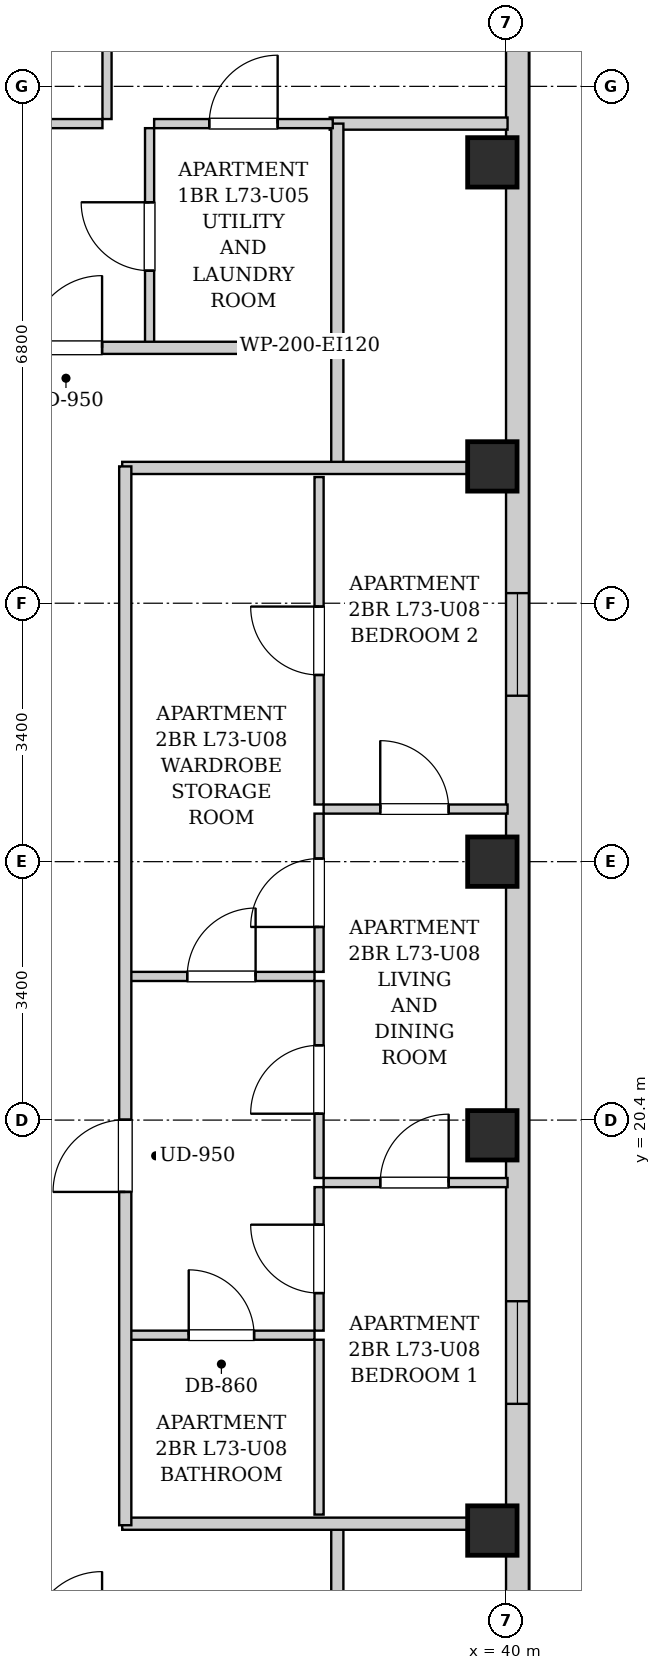
"""IFC4 building model, lengths in metres.
Left out: names, types, materials, properties, quantities, classifications, styles, units other than length and angle.
Written with IfcOpenShell. Run it as: python <this file> out.ifc"""

import sys

from ifc_helpers import new_model, si_unit, direction, frame, frame_2d, origin, origin_2d, place, context, subcontext, project, spatial, rectangle, extrude, element, fill, save


model = new_model("IFC4")
c1 = context("Model", 3, precision=1e-05, world=origin(), true_north=direction((0.0, 1.0)))
c2 = subcontext(c1, "Body", "Model", "MODEL_VIEW")
j1 = project(units=[si_unit("LENGTHUNIT", "METRE"), si_unit("PLANEANGLEUNIT", "RADIAN")], contexts=[c1])
p1 = place(None, origin())
s1 = spatial("IfcSite", under=j1, at=p1, CompositionType="ELEMENT")
p2 = place(p1, origin())
s2 = spatial("IfcBuilding", under=s1, at=p2, CompositionType="ELEMENT")
p3 = place(p2, frame((0.0, 0.0, 251.3)))
s3 = spatial("IfcBuildingStorey", under=s2, at=p3, CompositionType="ELEMENT", Elevation=251.3)
for number, where, z_axis, x_axis in (
    (1, (39.82, 15.0, 0.0), (0.0, 0.0, 1.0), (1.0, 0.0, 0.0)),
    (2, (39.82, 20.2, 0.0), (0.0, 0.0, 1.0), (1.0, 0.0, 0.0)),
    (3, (39.82, 23.8, 0.0), (0.0, 0.0, 1.0), (1.0, 0.0, 0.0)),
    (4, (39.82, 29.0, 0.0), (0.0, 0.0, 1.0), (1.0, 0.0, 0.0)),
    (5, (39.82, 33.0, 0.0), (0.0, 0.0, 1.0), (1.0, 0.0, 0.0)),
):
    element("IfcColumn", number, at=place(p3, frame(where, z_axis=z_axis, x_axis=x_axis)), inside=s3, PredefinedType="COLUMN", context=c2, shape_type="SweptSolid", body=[
        extrude(rectangle(XDim=0.65, YDim=0.65, at=origin_2d()), origin(), (0.0, 0.0, 1.0), 3.4),
    ])
p4 = place(p3, frame((40.15, 37.7, 0.0), z_axis=(0.0, 0.0, 1.0), x_axis=(0.0, -1.0, 0.0)))
e6 = element("IfcWall", 6, at=p4, inside=s3, PredefinedType="SOLIDWALL", context=c2, shape_type="SweptSolid", body=[
    extrude(rectangle(XDim=31.4, YDim=0.3, at=frame_2d((15.7, 0.0))), origin(), (0.0, 0.0, 1.0), 3.14),
])
p5 = place(p4, frame((28.546, 0.0, 0.55)))
e7 = element("IfcOpeningElement", 7, at=p5, cuts=e6, PredefinedType="OPENING", context=c2, shape_type="SweptSolid", body=[
    extrude(rectangle(XDim=1.35, YDim=1.2, at=frame_2d((0.675, 0.6))), frame((0.0, 0.16, 0.0), z_axis=(0.0, -1.0, 0.0), x_axis=(1.0, 0.0, 0.0)), (0.0, 0.0, 1.0), 0.32),
])
p6 = place(p4, frame((1.504, 0.0, 0.55)))
e8 = element("IfcOpeningElement", 8, at=p6, cuts=e6, PredefinedType="OPENING", context=c2, shape_type="SweptSolid", body=[
    extrude(rectangle(XDim=1.35, YDim=1.2, at=frame_2d((0.675, 0.6))), frame((0.0, 0.16, 0.0), z_axis=(0.0, -1.0, 0.0), x_axis=(1.0, 0.0, 0.0)), (0.0, 0.0, 1.0), 0.32),
])
p7 = place(p4, frame((19.683, 0.0, 0.55)))
e9 = element("IfcOpeningElement", 9, at=p7, cuts=e6, PredefinedType="OPENING", context=c2, shape_type="SweptSolid", body=[
    extrude(rectangle(XDim=1.35, YDim=1.2, at=frame_2d((0.675, 0.6))), frame((0.0, 0.16, 0.0), z_axis=(0.0, -1.0, 0.0), x_axis=(1.0, 0.0, 0.0)), (0.0, 0.0, 1.0), 0.32),
])
p8 = place(p4, frame((10.367, 0.0, 0.55)))
e10 = element("IfcOpeningElement", 10, at=p8, cuts=e6, PredefinedType="OPENING", context=c2, shape_type="SweptSolid", body=[
    extrude(rectangle(XDim=1.35, YDim=1.2, at=frame_2d((0.675, 0.6))), frame((0.0, 0.16, 0.0), z_axis=(0.0, -1.0, 0.0), x_axis=(1.0, 0.0, 0.0)), (0.0, 0.0, 1.0), 0.32),
])
for number, where, z_axis, x_axis in (
    (11, (37.78, 13.51, 0.0), (0.0, 0.0, 1.0), (0.0, 1.0, 0.0)),
    (12, (37.78, 28.98, 0.0), (0.0, 0.0, 1.0), (0.0, 1.0, 0.0)),
):
    element("IfcWall", number, at=place(p3, frame(where, z_axis=z_axis, x_axis=x_axis)), inside=s3, PredefinedType="PARTITIONING", context=c2, shape_type="SweptSolid", body=[
        extrude(rectangle(XDim=1.58, YDim=0.16, at=frame_2d((0.79, 0.0))), origin(), (0.0, 0.0, 1.0), 3.14),
    ])
for number, where, z_axis, x_axis in (
    (13, (34.95, 15.09, 0.0), (0.0, 0.0, 1.0), (1.0, 0.0, 0.0)),
    (14, (34.95, 28.98, 0.0), (0.0, 0.0, 1.0), (1.0, 0.0, 0.0)),
):
    element("IfcWall", number, at=place(p3, frame(where, z_axis=z_axis, x_axis=x_axis)), inside=s3, PredefinedType="PARTITIONING", context=c2, shape_type="SweptSolid", body=[
        extrude(rectangle(XDim=5.07, YDim=0.16, at=frame_2d((2.535, 0.0))), origin(), (0.0, 0.0, 1.0), 2.668),
    ])
p9 = place(p3, frame((37.68, 33.51, 0.0), z_axis=(0.0, 0.0, 1.0), x_axis=(1.0, 0.0, 0.0)))
e15 = element("IfcWall", 15, at=p9, inside=s3, PredefinedType="PARTITIONING", context=c2, shape_type="SweptSolid", body=[
    extrude(rectangle(XDim=2.34, YDim=0.16, at=frame_2d((1.17, 0.0))), origin(), (0.0, 0.0, 1.0), 3.14),
])
p10 = place(p3, frame((37.78, 30.6, 0.0), z_axis=(0.0, 0.0, 1.0), x_axis=(0.0, 1.0, 0.0)))
e16 = element("IfcWall", 16, at=p10, inside=s3, PredefinedType="PARTITIONING", context=c2, shape_type="SweptSolid", body=[
    extrude(rectangle(XDim=2.91, YDim=0.16, at=frame_2d((1.455, 0.0))), origin(), (0.0, 0.0, 1.0), 3.14),
])
p11 = place(p3, frame((35.31, 30.6, 0.0), z_axis=(0.0, 0.0, 1.0), x_axis=(0.0, 1.0, 0.0)))
e17 = element("IfcWall", 17, at=p11, inside=s3, PredefinedType="PARTITIONING", context=c2, shape_type="SweptSolid", body=[
    extrude(rectangle(XDim=2.85, YDim=0.12, at=frame_2d((1.425, 0.0))), origin(), (0.0, 0.0, 1.0), 3.14),
])
p12 = place(p11, frame((0.975, 0.0, 0.0)))
e18 = element("IfcOpeningElement", 18, at=p12, cuts=e17, PredefinedType="OPENING", context=c2, shape_type="SweptSolid", body=[
    extrude(rectangle(XDim=0.9, YDim=2.05, at=frame_2d((0.45, 1.025))), frame((0.0, 0.07, 0.0), z_axis=(0.0, -1.0, 0.0), x_axis=(1.0, 0.0, 0.0)), (0.0, 0.0, 1.0), 0.14),
])
p13 = place(p3, frame((31.8, 33.51, 0.0), z_axis=(0.0, 0.0, 1.0), x_axis=(1.0, 0.0, 0.0)))
e19 = element("IfcWall", 19, at=p13, inside=s3, PredefinedType="PARTITIONING", context=c2, shape_type="SweptSolid", body=[
    extrude(rectangle(XDim=2.89, YDim=0.12, at=frame_2d((1.445, 0.0))), origin(), (0.0, 0.0, 1.0), 3.14),
])
p14 = place(p13, frame((0.995, 0.0, 0.0)))
e20 = element("IfcOpeningElement", 20, at=p14, cuts=e19, PredefinedType="OPENING", context=c2, shape_type="SweptSolid", body=[
    extrude(rectangle(XDim=0.9, YDim=2.05, at=frame_2d((0.45, 1.025))), frame((0.0, 0.07, 0.0), z_axis=(0.0, -1.0, 0.0), x_axis=(1.0, 0.0, 0.0)), (0.0, 0.0, 1.0), 0.14),
])
p15 = place(p3, frame((35.37, 33.51, 0.0), z_axis=(0.0, 0.0, 1.0), x_axis=(1.0, 0.0, 0.0)))
e21 = element("IfcWall", 21, at=p15, inside=s3, PredefinedType="PARTITIONING", context=c2, shape_type="SweptSolid", body=[
    extrude(rectangle(XDim=2.35, YDim=0.12, at=frame_2d((1.175, 0.0))), origin(), (0.0, 0.0, 1.0), 3.14),
])
p16 = place(p15, frame((0.725, 0.0, 0.0)))
e22 = element("IfcOpeningElement", 22, at=p16, cuts=e21, PredefinedType="OPENING", context=c2, shape_type="SweptSolid", body=[
    extrude(rectangle(XDim=0.9, YDim=2.05, at=frame_2d((0.45, 1.025))), frame((0.0, 0.07, 0.0), z_axis=(0.0, -1.0, 0.0), x_axis=(1.0, 0.0, 0.0)), (0.0, 0.0, 1.0), 0.14),
])
p17 = place(p3, frame((34.75, 33.57, 0.0), z_axis=(0.0, 0.0, 1.0), x_axis=(0.0, 1.0, 0.0)))
e23 = element("IfcWall", 23, at=p17, inside=s3, PredefinedType="PARTITIONING", context=c2, shape_type="SweptSolid", body=[
    extrude(rectangle(XDim=4.2, YDim=0.12, at=frame_2d((2.1, 0.0))), origin(), (0.0, 0.0, 1.0), 3.14),
])
p18 = place(p17, frame((1.65, 0.0, 0.0)))
e24 = element("IfcOpeningElement", 24, at=p18, cuts=e23, PredefinedType="OPENING", context=c2, shape_type="SweptSolid", body=[
    extrude(rectangle(XDim=0.9, YDim=2.05, at=frame_2d((0.45, 1.025))), frame((0.0, 0.07, 0.0), z_axis=(0.0, -1.0, 0.0), x_axis=(1.0, 0.0, 0.0)), (0.0, 0.0, 1.0), 0.14),
])
p19 = place(p3, frame((35.03, 22.29, 0.0), z_axis=(0.0, 0.0, 1.0), x_axis=(1.0, 0.0, 0.0)))
e25 = element("IfcWall", 25, at=p19, inside=s3, PredefinedType="PARTITIONING", context=c2, shape_type="SweptSolid", body=[
    extrude(rectangle(XDim=2.45, YDim=0.12, at=frame_2d((1.225, 0.0))), origin(), (0.0, 0.0, 1.0), 3.14),
])
p20 = place(p19, frame((0.775, 0.0, 0.0)))
e26 = element("IfcOpeningElement", 26, at=p20, cuts=e25, PredefinedType="OPENING", context=c2, shape_type="SweptSolid", body=[
    extrude(rectangle(XDim=0.9, YDim=2.05, at=frame_2d((0.45, 1.025))), frame((0.0, 0.07, 0.0), z_axis=(0.0, -1.0, 0.0), x_axis=(1.0, 0.0, 0.0)), (0.0, 0.0, 1.0), 0.14),
])
p21 = place(p3, frame((37.54, 22.35, 0.0), z_axis=(0.0, 0.0, 1.0), x_axis=(0.0, 1.0, 0.0)))
e27 = element("IfcWall", 27, at=p21, inside=s3, PredefinedType="PARTITIONING", context=c2, shape_type="SweptSolid", body=[
    extrude(rectangle(XDim=2.082, YDim=0.12, at=frame_2d((1.041, 0.0))), origin(), (0.0, 0.0, 1.0), 3.14),
])
p22 = place(p21, frame((0.591, 0.0, 0.0)))
e28 = element("IfcOpeningElement", 28, at=p22, cuts=e27, PredefinedType="OPENING", context=c2, shape_type="SweptSolid", body=[
    extrude(rectangle(XDim=0.9, YDim=2.05, at=frame_2d((0.45, 1.025))), frame((0.0, 0.07, 0.0), z_axis=(0.0, -1.0, 0.0), x_axis=(1.0, 0.0, 0.0)), (0.0, 0.0, 1.0), 0.14),
])
p23 = place(p3, frame((37.54, 24.552, 0.0), z_axis=(0.0, 0.0, 1.0), x_axis=(0.0, 1.0, 0.0)))
e29 = element("IfcWall", 29, at=p23, inside=s3, PredefinedType="PARTITIONING", context=c2, shape_type="SweptSolid", body=[
    extrude(rectangle(XDim=4.308, YDim=0.12, at=frame_2d((2.154, 0.0))), origin(), (0.0, 0.0, 1.0), 3.14),
])
p24 = place(p23, frame((1.704, 0.0, 0.0)))
e30 = element("IfcOpeningElement", 30, at=p24, cuts=e29, PredefinedType="OPENING", context=c2, shape_type="SweptSolid", body=[
    extrude(rectangle(XDim=0.9, YDim=2.05, at=frame_2d((0.45, 1.025))), frame((0.0, 0.07, 0.0), z_axis=(0.0, -1.0, 0.0), x_axis=(1.0, 0.0, 0.0)), (0.0, 0.0, 1.0), 0.14),
])
p25 = place(p3, frame((35.03, 17.57, 0.0), z_axis=(0.0, 0.0, 1.0), x_axis=(1.0, 0.0, 0.0)))
e31 = element("IfcWall", 31, at=p25, inside=s3, PredefinedType="PARTITIONING", context=c2, shape_type="SweptSolid", body=[
    extrude(rectangle(XDim=2.45, YDim=0.12, at=frame_2d((1.225, 0.0))), origin(), (0.0, 0.0, 1.0), 3.14),
])
p26 = place(p25, frame((0.795, 0.0, 0.0)))
e32 = element("IfcOpeningElement", 32, at=p26, cuts=e31, PredefinedType="OPENING", context=c2, shape_type="SweptSolid", body=[
    extrude(rectangle(XDim=0.86, YDim=2.05, at=frame_2d((0.43, 1.025))), frame((0.0, 0.07, 0.0), z_axis=(0.0, -1.0, 0.0), x_axis=(1.0, 0.0, 0.0)), (0.0, 0.0, 1.0), 0.14),
])
p27 = place(p3, frame((37.54, 15.21, 0.0), z_axis=(0.0, 0.0, 1.0), x_axis=(0.0, 1.0, 0.0)))
e33 = element("IfcWall", 33, at=p27, inside=s3, PredefinedType="PARTITIONING", context=c2, shape_type="SweptSolid", body=[
    extrude(rectangle(XDim=2.3, YDim=0.12, at=frame_2d((1.15, 0.0))), origin(), (0.0, 0.0, 1.0), 3.14),
])
p28 = place(p3, frame((37.54, 17.63, 0.0), z_axis=(0.0, 0.0, 1.0), x_axis=(0.0, 1.0, 0.0)))
e34 = element("IfcWall", 34, at=p28, inside=s3, PredefinedType="PARTITIONING", context=c2, shape_type="SweptSolid", body=[
    extrude(rectangle(XDim=1.888, YDim=0.12, at=frame_2d((0.944, 0.0))), origin(), (0.0, 0.0, 1.0), 3.14),
])
p29 = place(p28, frame((0.494, 0.0, 0.0)))
e35 = element("IfcOpeningElement", 35, at=p29, cuts=e34, PredefinedType="OPENING", context=c2, shape_type="SweptSolid", body=[
    extrude(rectangle(XDim=0.9, YDim=2.05, at=frame_2d((0.45, 1.025))), frame((0.0, 0.07, 0.0), z_axis=(0.0, -1.0, 0.0), x_axis=(1.0, 0.0, 0.0)), (0.0, 0.0, 1.0), 0.14),
])
p30 = place(p3, frame((37.54, 19.638, 0.0), z_axis=(0.0, 0.0, 1.0), x_axis=(0.0, 1.0, 0.0)))
e36 = element("IfcWall", 36, at=p30, inside=s3, PredefinedType="PARTITIONING", context=c2, shape_type="SweptSolid", body=[
    extrude(rectangle(XDim=2.592, YDim=0.12, at=frame_2d((1.296, 0.0))), origin(), (0.0, 0.0, 1.0), 3.14),
])
p31 = place(p30, frame((0.846, 0.0, 0.0)))
e37 = element("IfcOpeningElement", 37, at=p31, cuts=e36, PredefinedType="OPENING", context=c2, shape_type="SweptSolid", body=[
    extrude(rectangle(XDim=0.9, YDim=2.05, at=frame_2d((0.45, 1.025))), frame((0.0, 0.07, 0.0), z_axis=(0.0, -1.0, 0.0), x_axis=(1.0, 0.0, 0.0)), (0.0, 0.0, 1.0), 0.14),
])
p32 = place(p3, frame((37.6, 19.578, 0.0), z_axis=(0.0, 0.0, 1.0), x_axis=(1.0, 0.0, 0.0)))
e38 = element("IfcWall", 38, at=p32, inside=s3, PredefinedType="PARTITIONING", context=c2, shape_type="SweptSolid", body=[
    extrude(rectangle(XDim=2.42, YDim=0.12, at=frame_2d((1.21, 0.0))), origin(), (0.0, 0.0, 1.0), 3.14),
])
p33 = place(p32, frame((0.745, 0.0, 0.0)))
e39 = element("IfcOpeningElement", 39, at=p33, cuts=e38, PredefinedType="OPENING", context=c2, shape_type="SweptSolid", body=[
    extrude(rectangle(XDim=0.9, YDim=2.05, at=frame_2d((0.45, 1.025))), frame((0.0, 0.07, 0.0), z_axis=(0.0, -1.0, 0.0), x_axis=(1.0, 0.0, 0.0)), (0.0, 0.0, 1.0), 0.14),
])
p34 = place(p3, frame((37.6, 24.492, 0.0), z_axis=(0.0, 0.0, 1.0), x_axis=(1.0, 0.0, 0.0)))
e40 = element("IfcWall", 40, at=p34, inside=s3, PredefinedType="PARTITIONING", context=c2, shape_type="SweptSolid", body=[
    extrude(rectangle(XDim=2.42, YDim=0.12, at=frame_2d((1.21, 0.0))), origin(), (0.0, 0.0, 1.0), 2.878),
])
p35 = place(p34, frame((0.745, 0.0, 0.0)))
e41 = element("IfcOpeningElement", 41, at=p35, cuts=e40, PredefinedType="OPENING", context=c2, shape_type="SweptSolid", body=[
    extrude(rectangle(XDim=0.9, YDim=2.05, at=frame_2d((0.45, 1.025))), frame((0.0, 0.07, 0.0), z_axis=(0.0, -1.0, 0.0), x_axis=(1.0, 0.0, 0.0)), (0.0, 0.0, 1.0), 0.14),
])
p36 = place(p3, frame((13.15, 30.56, 0.0), z_axis=(0.0, 0.0, 1.0), x_axis=(1.0, 0.0, 0.0)))
e42 = element("IfcWall", 42, at=p36, inside=s3, PredefinedType="PARTITIONING", context=c2, shape_type="SweptSolid", body=[
    extrude(rectangle(XDim=24.6, YDim=0.16, at=frame_2d((12.3, 0.0))), origin(), (0.0, 0.0, 1.0), 3.14),
])
p37 = place(p36, frame((3.165, 0.0, 0.0)))
e43 = element("IfcOpeningElement", 43, at=p37, cuts=e42, PredefinedType="OPENING", context=c2, shape_type="SweptSolid", body=[
    extrude(rectangle(XDim=0.95, YDim=2.1, at=frame_2d((0.475, 1.05))), frame((0.0, 0.09, 0.0), z_axis=(0.0, -1.0, 0.0), x_axis=(1.0, 0.0, 0.0)), (0.0, 0.0, 1.0), 0.18),
])
p38 = place(p36, frame((20.585, 0.0, 0.0)))
e44 = element("IfcOpeningElement", 44, at=p38, cuts=e42, PredefinedType="OPENING", context=c2, shape_type="SweptSolid", body=[
    extrude(rectangle(XDim=0.95, YDim=2.1, at=frame_2d((0.475, 1.05))), frame((0.0, 0.09, 0.0), z_axis=(0.0, -1.0, 0.0), x_axis=(1.0, 0.0, 0.0)), (0.0, 0.0, 1.0), 0.18),
])
p39 = place(p3, frame((34.99, 15.07, 0.0), z_axis=(0.0, 0.0, 1.0), x_axis=(0.0, 1.0, 0.0)))
e45 = element("IfcWall", 45, at=p39, inside=s3, PredefinedType="PARTITIONING", context=c2, shape_type="SweptSolid", body=[
    extrude(rectangle(XDim=13.93, YDim=0.16, at=frame_2d((6.965, 0.0))), origin(), (0.0, 0.0, 1.0), 3.14),
])
p40 = place(p39, frame((4.385, 0.0, 0.0)))
e46 = element("IfcOpeningElement", 46, at=p40, cuts=e45, PredefinedType="OPENING", context=c2, shape_type="SweptSolid", body=[
    extrude(rectangle(XDim=0.95, YDim=2.1, at=frame_2d((0.475, 1.05))), frame((0.0, 0.09, 0.0), z_axis=(0.0, -1.0, 0.0), x_axis=(1.0, 0.0, 0.0)), (0.0, 0.0, 1.0), 0.18),
])
p41 = place(p12, origin())
e47 = element("IfcDoor", 47, at=p41, inside=s3, OperationType="SINGLE_SWING_RIGHT", PredefinedType="DOOR", context=c2, shape_type="SweptSolid", body=[
    extrude(rectangle(XDim=0.9, YDim=2.05, at=frame_2d((0.45, 1.025))), frame((0.0, 0.025, 0.0), z_axis=(0.0, -1.0, 0.0), x_axis=(1.0, 0.0, 0.0)), (0.0, 0.0, 1.0), 0.05),
])
fill(e18, e47)
p42 = place(p16, origin())
e48 = element("IfcDoor", 48, at=p42, inside=s3, OperationType="SINGLE_SWING_RIGHT", PredefinedType="DOOR", context=c2, shape_type="SweptSolid", body=[
    extrude(rectangle(XDim=0.9, YDim=2.05, at=frame_2d((0.45, 1.025))), frame((0.0, 0.025, 0.0), z_axis=(0.0, -1.0, 0.0), x_axis=(1.0, 0.0, 0.0)), (0.0, 0.0, 1.0), 0.05),
])
fill(e22, e48)
p43 = place(p20, origin())
e49 = element("IfcDoor", 49, at=p43, inside=s3, OperationType="SINGLE_SWING_RIGHT", PredefinedType="DOOR", context=c2, shape_type="SweptSolid", body=[
    extrude(rectangle(XDim=0.9, YDim=2.05, at=frame_2d((0.45, 1.025))), frame((0.0, 0.025, 0.0), z_axis=(0.0, -1.0, 0.0), x_axis=(1.0, 0.0, 0.0)), (0.0, 0.0, 1.0), 0.05),
])
fill(e26, e49)
p44 = place(p22, origin())
e50 = element("IfcDoor", 50, at=p44, inside=s3, OperationType="SINGLE_SWING_LEFT", PredefinedType="DOOR", context=c2, shape_type="SweptSolid", body=[
    extrude(rectangle(XDim=0.9, YDim=2.05, at=frame_2d((0.45, 1.025))), frame((0.0, 0.025, 0.0), z_axis=(0.0, -1.0, 0.0), x_axis=(1.0, 0.0, 0.0)), (0.0, 0.0, 1.0), 0.05),
])
fill(e28, e50)
p45 = place(p24, origin())
e51 = element("IfcDoor", 51, at=p45, inside=s3, OperationType="SINGLE_SWING_RIGHT", PredefinedType="DOOR", context=c2, shape_type="SweptSolid", body=[
    extrude(rectangle(XDim=0.9, YDim=2.05, at=frame_2d((0.45, 1.025))), frame((0.0, 0.025, 0.0), z_axis=(0.0, -1.0, 0.0), x_axis=(1.0, 0.0, 0.0)), (0.0, 0.0, 1.0), 0.05),
])
fill(e30, e51)
p46 = place(p26, origin())
e52 = element("IfcDoor", 52, at=p46, inside=s3, OperationType="SINGLE_SWING_LEFT", PredefinedType="DOOR", context=c2, shape_type="SweptSolid", body=[
    extrude(rectangle(XDim=0.86, YDim=2.05, at=frame_2d((0.43, 1.025))), frame((0.0, 0.025, 0.0), z_axis=(0.0, -1.0, 0.0), x_axis=(1.0, 0.0, 0.0)), (0.0, 0.0, 1.0), 0.05),
])
fill(e32, e52)
p47 = place(p29, origin())
e53 = element("IfcDoor", 53, at=p47, inside=s3, OperationType="SINGLE_SWING_RIGHT", PredefinedType="DOOR", context=c2, shape_type="SweptSolid", body=[
    extrude(rectangle(XDim=0.9, YDim=2.05, at=frame_2d((0.45, 1.025))), frame((0.0, 0.025, 0.0), z_axis=(0.0, -1.0, 0.0), x_axis=(1.0, 0.0, 0.0)), (0.0, 0.0, 1.0), 0.05),
])
fill(e35, e53)
p48 = place(p31, origin())
e54 = element("IfcDoor", 54, at=p48, inside=s3, OperationType="SINGLE_SWING_LEFT", PredefinedType="DOOR", context=c2, shape_type="SweptSolid", body=[
    extrude(rectangle(XDim=0.9, YDim=2.05, at=frame_2d((0.45, 1.025))), frame((0.0, 0.025, 0.0), z_axis=(0.0, -1.0, 0.0), x_axis=(1.0, 0.0, 0.0)), (0.0, 0.0, 1.0), 0.05),
])
fill(e37, e54)
p49 = place(p33, origin())
e55 = element("IfcDoor", 55, at=p49, inside=s3, OperationType="SINGLE_SWING_RIGHT", PredefinedType="DOOR", context=c2, shape_type="SweptSolid", body=[
    extrude(rectangle(XDim=0.9, YDim=2.05, at=frame_2d((0.45, 1.025))), frame((0.0, 0.025, 0.0), z_axis=(0.0, -1.0, 0.0), x_axis=(1.0, 0.0, 0.0)), (0.0, 0.0, 1.0), 0.05),
])
fill(e39, e55)
p50 = place(p35, origin())
e56 = element("IfcDoor", 56, at=p50, inside=s3, OperationType="SINGLE_SWING_LEFT", PredefinedType="DOOR", context=c2, shape_type="SweptSolid", body=[
    extrude(rectangle(XDim=0.9, YDim=2.05, at=frame_2d((0.45, 1.025))), frame((0.0, 0.025, 0.0), z_axis=(0.0, -1.0, 0.0), x_axis=(1.0, 0.0, 0.0)), (0.0, 0.0, 1.0), 0.05),
])
fill(e41, e56)
p51 = place(p38, origin())
e57 = element("IfcDoor", 57, at=p51, inside=s3, OperationType="SINGLE_SWING_RIGHT", PredefinedType="DOOR", context=c2, shape_type="SweptSolid", body=[
    extrude(rectangle(XDim=0.95, YDim=2.1, at=frame_2d((0.475, 1.05))), frame((0.0, 0.025, 0.0), z_axis=(0.0, -1.0, 0.0), x_axis=(1.0, 0.0, 0.0)), (0.0, 0.0, 1.0), 0.05),
])
fill(e44, e57)
p52 = place(p40, origin())
e58 = element("IfcDoor", 58, at=p52, inside=s3, OperationType="SINGLE_SWING_LEFT", PredefinedType="DOOR", context=c2, shape_type="SweptSolid", body=[
    extrude(rectangle(XDim=0.95, YDim=2.1, at=frame_2d((0.475, 1.05))), frame((0.0, 0.025, 0.0), z_axis=(0.0, -1.0, 0.0), x_axis=(1.0, 0.0, 0.0)), (0.0, 0.0, 1.0), 0.05),
])
fill(e46, e58)
p53 = place(p7, origin())
e59 = element("IfcWindow", 59, at=p53, inside=s3, PartitioningType="SINGLE_PANEL", PredefinedType="WINDOW", context=c2, shape_type="SweptSolid", body=[
    extrude(rectangle(XDim=1.35, YDim=1.2, at=frame_2d((0.675, 0.6))), frame((0.0, 0.03, 0.0), z_axis=(0.0, -1.0, 0.0), x_axis=(1.0, 0.0, 0.0)), (0.0, 0.0, 1.0), 0.06),
])
fill(e9, e59)
p54 = place(p8, origin())
e60 = element("IfcWindow", 60, at=p54, inside=s3, PartitioningType="SINGLE_PANEL", PredefinedType="WINDOW", context=c2, shape_type="SweptSolid", body=[
    extrude(rectangle(XDim=1.35, YDim=1.2, at=frame_2d((0.675, 0.6))), frame((0.0, 0.03, 0.0), z_axis=(0.0, -1.0, 0.0), x_axis=(1.0, 0.0, 0.0)), (0.0, 0.0, 1.0), 0.06),
])
fill(e10, e60)
save(model, sys.argv[1])
